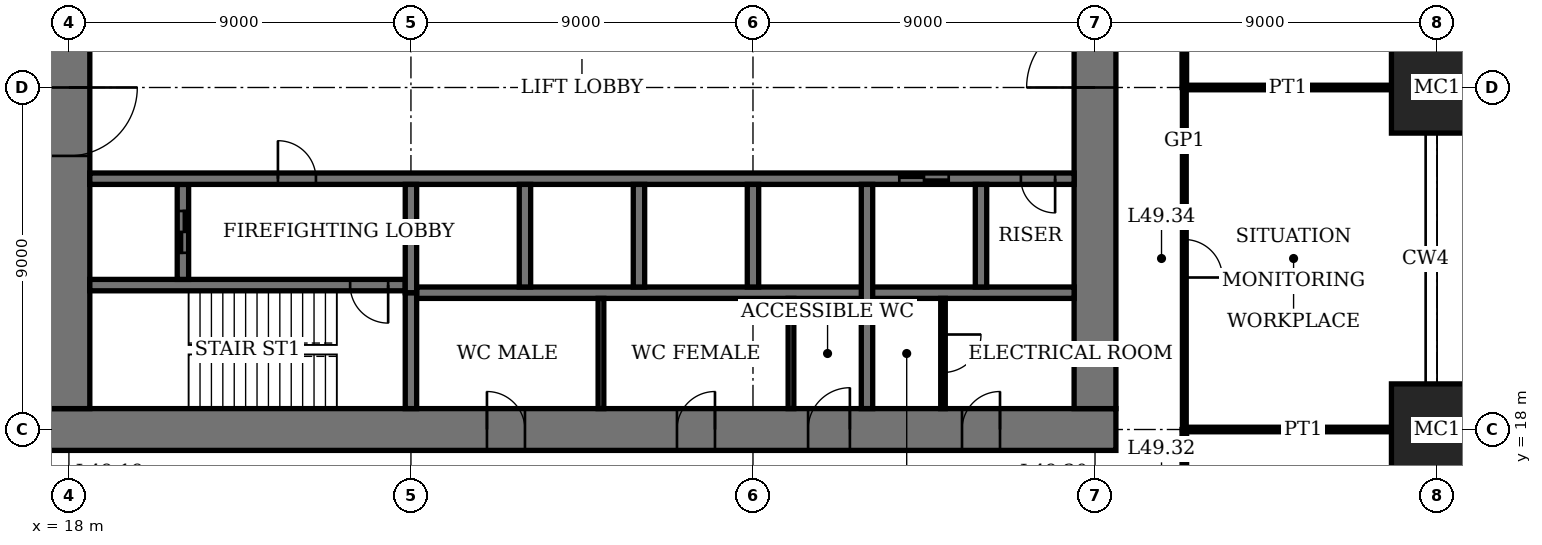
"""IFC4 building model, lengths in metres.
Left out: names, types, materials, properties, quantities, classifications, styles, units other than length and angle.
Written with IfcOpenShell. Run it as: python <this file> out.ifc"""

import sys

from ifc_helpers import new_model, si_unit, direction, frame, frame_2d, origin, origin_2d, place, context, subcontext, project, spatial, rectangle, extrude, element, fill, save


model = new_model("IFC4")
c1 = context("Model", 3, precision=1e-05, world=origin(), true_north=direction((0.0, 1.0)))
c2 = subcontext(c1, "Body", "Model", "MODEL_VIEW")
j1 = project(units=[si_unit("LENGTHUNIT", "METRE"), si_unit("PLANEANGLEUNIT", "RADIAN")], contexts=[c1])
p1 = place(None, origin())
s1 = spatial("IfcSite", under=j1, at=p1, CompositionType="ELEMENT")
p2 = place(p1, origin())
s2 = spatial("IfcBuilding", under=s1, at=p2, CompositionType="ELEMENT")
p3 = place(p2, frame((0.0, 0.0, 202.2)))
s3 = spatial("IfcBuildingStorey", under=s2, at=p3, CompositionType="ELEMENT", Elevation=202.2)
for number, where, z_axis, x_axis in (
    (1, (54.0, 18.0, 0.0), (0.0, 0.0, 1.0), (1.0, 0.0, 0.0)),
    (2, (54.0, 27.0, 0.0), (0.0, 0.0, 1.0), (1.0, 0.0, 0.0)),
):
    element("IfcColumn", number, at=place(p3, frame(where, z_axis=z_axis, x_axis=x_axis)), inside=s3, PredefinedType="COLUMN", context=c2, shape_type="SweptSolid", body=[
        extrude(rectangle(XDim=2.4, YDim=2.4, at=origin_2d()), origin(), (0.0, 0.0, 1.0), 4.0),
    ])
p4 = place(p3, frame((17.45, 18.0, 0.0), z_axis=(0.0, 0.0, 1.0), x_axis=(1.0, 0.0, 0.0)))
e3 = element("IfcWall", 3, at=p4, inside=s3, PredefinedType="SHEAR", context=c2, shape_type="SweptSolid", body=[
    extrude(rectangle(XDim=28.1, YDim=1.1, at=frame_2d((14.05, 0.0))), origin(), (0.0, 0.0, 1.0), 4.0),
])
p5 = place(p4, frame((11.55, 0.0, 0.0)))
e4 = element("IfcOpeningElement", 4, at=p5, cuts=e3, PredefinedType="OPENING", context=c2, shape_type="SweptSolid", body=[
    extrude(rectangle(XDim=1.0, YDim=2.4, at=frame_2d((0.5, 1.2))), frame((0.0, 0.56, 0.0), z_axis=(0.0, -1.0, 0.0), x_axis=(1.0, 0.0, 0.0)), (0.0, 0.0, 1.0), 1.12),
])
p6 = place(p4, frame((16.55, 0.0, 0.0)))
e5 = element("IfcOpeningElement", 5, at=p6, cuts=e3, PredefinedType="OPENING", context=c2, shape_type="SweptSolid", body=[
    extrude(rectangle(XDim=1.0, YDim=2.4, at=frame_2d((0.5, 1.2))), frame((0.0, 0.56, 0.0), z_axis=(0.0, -1.0, 0.0), x_axis=(1.0, 0.0, 0.0)), (0.0, 0.0, 1.0), 1.12),
])
p7 = place(p4, frame((20.0, 0.0, 0.0)))
e6 = element("IfcOpeningElement", 6, at=p7, cuts=e3, PredefinedType="OPENING", context=c2, shape_type="SweptSolid", body=[
    extrude(rectangle(XDim=1.1, YDim=2.4, at=frame_2d((0.55, 1.2))), frame((0.0, 0.56, 0.0), z_axis=(0.0, -1.0, 0.0), x_axis=(1.0, 0.0, 0.0)), (0.0, 0.0, 1.0), 1.12),
])
p8 = place(p4, frame((24.05, 0.0, 0.0)))
e7 = element("IfcOpeningElement", 7, at=p8, cuts=e3, PredefinedType="OPENING", context=c2, shape_type="SweptSolid", body=[
    extrude(rectangle(XDim=1.0, YDim=2.4, at=frame_2d((0.5, 1.2))), frame((0.0, 0.56, 0.0), z_axis=(0.0, -1.0, 0.0), x_axis=(1.0, 0.0, 0.0)), (0.0, 0.0, 1.0), 1.12),
])
p9 = place(p3, frame((18.0, 35.45, 0.0), z_axis=(0.0, 0.0, 1.0), x_axis=(0.0, -1.0, 0.0)))
e8 = element("IfcWall", 8, at=p9, inside=s3, PredefinedType="SHEAR", context=c2, shape_type="SweptSolid", body=[
    extrude(rectangle(XDim=16.9, YDim=1.1, at=frame_2d((8.45, 0.0))), origin(), (0.0, 0.0, 1.0), 4.0),
])
p10 = place(p9, frame((8.45, 0.0, 0.0)))
e9 = element("IfcOpeningElement", 9, at=p10, cuts=e8, PredefinedType="OPENING", context=c2, shape_type="SweptSolid", body=[
    extrude(rectangle(XDim=1.8, YDim=2.4, at=frame_2d((0.9, 1.2))), frame((0.0, 0.56, 0.0), z_axis=(0.0, -1.0, 0.0), x_axis=(1.0, 0.0, 0.0)), (0.0, 0.0, 1.0), 1.12),
])
p11 = place(p3, frame((45.0, 18.55, 0.0), z_axis=(0.0, 0.0, 1.0), x_axis=(0.0, 1.0, 0.0)))
e10 = element("IfcWall", 10, at=p11, inside=s3, PredefinedType="SHEAR", context=c2, shape_type="SweptSolid", body=[
    extrude(rectangle(XDim=16.9, YDim=1.1, at=frame_2d((8.45, 0.0))), origin(), (0.0, 0.0, 1.0), 4.0),
])
p12 = place(p11, frame((8.45, 0.0, 0.0)))
e11 = element("IfcOpeningElement", 11, at=p12, cuts=e10, PredefinedType="OPENING", context=c2, shape_type="SweptSolid", body=[
    extrude(rectangle(XDim=1.8, YDim=2.4, at=frame_2d((0.9, 1.2))), frame((0.0, 0.56, 0.0), z_axis=(0.0, -1.0, 0.0), x_axis=(1.0, 0.0, 0.0)), (0.0, 0.0, 1.0), 1.12),
])
p13 = place(p3, frame((18.55, 21.8, 0.0), z_axis=(0.0, 0.0, 1.0), x_axis=(1.0, 0.0, 0.0)))
e12 = element("IfcWall", 12, at=p13, inside=s3, PredefinedType="SHEAR", context=c2, shape_type="SweptSolid", body=[
    extrude(rectangle(XDim=8.3, YDim=0.3, at=frame_2d((4.15, 0.0))), origin(), (0.0, 0.0, 1.0), 4.0),
])
p14 = place(p13, frame((6.85, 0.0, 0.0)))
e13 = element("IfcOpeningElement", 13, at=p14, cuts=e12, PredefinedType="OPENING", context=c2, shape_type="SweptSolid", body=[
    extrude(rectangle(XDim=1.0, YDim=2.4, at=frame_2d((0.5, 1.2))), frame((0.0, 0.16, 0.0), z_axis=(0.0, -1.0, 0.0), x_axis=(1.0, 0.0, 0.0)), (0.0, 0.0, 1.0), 0.32),
])
p15 = place(p3, frame((27.0, 18.55, 0.0), z_axis=(0.0, 0.0, 1.0), x_axis=(0.0, 1.0, 0.0)))
e14 = element("IfcWall", 14, at=p15, inside=s3, PredefinedType="SHEAR", context=c2, shape_type="SweptSolid", body=[
    extrude(rectangle(XDim=3.05, YDim=0.3, at=frame_2d((1.525, 0.0))), origin(), (0.0, 0.0, 1.0), 4.0),
])
p16 = place(p3, frame((21.0, 21.95, 0.0), z_axis=(0.0, 0.0, 1.0), x_axis=(0.0, 1.0, 0.0)))
e15 = element("IfcWall", 15, at=p16, inside=s3, PredefinedType="SHEAR", context=c2, shape_type="SweptSolid", body=[
    extrude(rectangle(XDim=2.5, YDim=0.3, at=frame_2d((1.25, 0.0))), origin(), (0.0, 0.0, 1.0), 4.0),
])
p17 = place(p16, frame((0.7, 0.0, 0.0)))
e16 = element("IfcOpeningElement", 16, at=p17, cuts=e15, PredefinedType="OPENING", context=c2, shape_type="SweptSolid", body=[
    extrude(rectangle(XDim=1.1, YDim=2.4, at=frame_2d((0.55, 1.2))), frame((0.0, 0.16, 0.0), z_axis=(0.0, -1.0, 0.0), x_axis=(1.0, 0.0, 0.0)), (0.0, 0.0, 1.0), 0.32),
])
p18 = place(p3, frame((18.55, 24.6, 0.0), z_axis=(0.0, 0.0, 1.0), x_axis=(1.0, 0.0, 0.0)))
e17 = element("IfcWall", 17, at=p18, inside=s3, PredefinedType="SHEAR", context=c2, shape_type="SweptSolid", body=[
    extrude(rectangle(XDim=25.9, YDim=0.3, at=frame_2d((12.95, 0.0))), origin(), (0.0, 0.0, 1.0), 4.0),
])
p19 = place(p18, frame((4.95, 0.0, 0.0)))
e18 = element("IfcOpeningElement", 18, at=p19, cuts=e17, PredefinedType="OPENING", context=c2, shape_type="SweptSolid", body=[
    extrude(rectangle(XDim=1.0, YDim=2.4, at=frame_2d((0.5, 1.2))), frame((0.0, 0.16, 0.0), z_axis=(0.0, -1.0, 0.0), x_axis=(1.0, 0.0, 0.0)), (0.0, 0.0, 1.0), 0.32),
])
p20 = place(p18, frame((24.5, 0.0, 0.0)))
e19 = element("IfcOpeningElement", 19, at=p20, cuts=e17, PredefinedType="OPENING", context=c2, shape_type="SweptSolid", body=[
    extrude(rectangle(XDim=0.9, YDim=2.1, at=frame_2d((0.45, 1.05))), frame((0.0, 0.16, 0.0), z_axis=(0.0, -1.0, 0.0), x_axis=(1.0, 0.0, 0.0)), (0.0, 0.0, 1.0), 0.32),
])
p21 = place(p18, frame((21.3, 0.0, 0.0)))
e20 = element("IfcOpeningElement", 20, at=p21, cuts=e17, PredefinedType="OPENING", context=c2, shape_type="SweptSolid", body=[
    extrude(rectangle(XDim=1.3, YDim=2.4, at=frame_2d((0.65, 1.2))), frame((0.0, 0.16, 0.0), z_axis=(0.0, -1.0, 0.0), x_axis=(1.0, 0.0, 0.0)), (0.0, 0.0, 1.0), 0.32),
])
p22 = place(p3, frame((27.15, 21.6, 0.0), z_axis=(0.0, 0.0, 1.0), x_axis=(1.0, 0.0, 0.0)))
e21 = element("IfcWall", 21, at=p22, inside=s3, PredefinedType="SHEAR", context=c2, shape_type="SweptSolid", body=[
    extrude(rectangle(XDim=17.3, YDim=0.3, at=frame_2d((8.65, 0.0))), origin(), (0.0, 0.0, 1.0), 4.0),
])
for number, where, z_axis, x_axis in (
    (22, (30.0, 21.75, 0.0), (0.0, 0.0, 1.0), (0.0, 1.0, 0.0)),
    (23, (33.0, 21.75, 0.0), (0.0, 0.0, 1.0), (0.0, 1.0, 0.0)),
    (24, (36.0, 21.75, 0.0), (0.0, 0.0, 1.0), (0.0, 1.0, 0.0)),
):
    element("IfcWall", number, at=place(p3, frame(where, z_axis=z_axis, x_axis=x_axis)), inside=s3, PredefinedType="SHEAR", context=c2, shape_type="SweptSolid", body=[
        extrude(rectangle(XDim=2.7, YDim=0.3, at=frame_2d((1.35, 0.0))), origin(), (0.0, 0.0, 1.0), 4.0),
    ])
p23 = place(p3, frame((39.0, 18.55, 0.0), z_axis=(0.0, 0.0, 1.0), x_axis=(0.0, 1.0, 0.0)))
e25 = element("IfcWall", 25, at=p23, inside=s3, PredefinedType="SHEAR", context=c2, shape_type="SweptSolid", body=[
    extrude(rectangle(XDim=5.9, YDim=0.3, at=frame_2d((2.95, 0.0))), origin(), (0.0, 0.0, 1.0), 4.0),
])
p24 = place(p3, frame((42.0, 21.75, 0.0), z_axis=(0.0, 0.0, 1.0), x_axis=(0.0, 1.0, 0.0)))
e26 = element("IfcWall", 26, at=p24, inside=s3, PredefinedType="SHEAR", context=c2, shape_type="SweptSolid", body=[
    extrude(rectangle(XDim=2.7, YDim=0.3, at=frame_2d((1.35, 0.0))), origin(), (0.0, 0.0, 1.0), 4.0),
])
p25 = place(p3, frame((27.0, 21.6, 0.0), z_axis=(0.0, 0.0, 1.0), x_axis=(0.0, 1.0, 0.0)))
e27 = element("IfcWall", 27, at=p25, inside=s3, PredefinedType="SHEAR", context=c2, shape_type="SweptSolid", body=[
    extrude(rectangle(XDim=2.85, YDim=0.3, at=frame_2d((1.425, 0.0))), origin(), (0.0, 0.0, 1.0), 4.0),
])
for number, where, z_axis, x_axis in (
    (28, (47.35, 18.0, 0.0), (0.0, 0.0, 1.0), (1.0, 0.0, 0.0)),
    (29, (47.35, 27.0, 0.0), (0.0, 0.0, 1.0), (1.0, 0.0, 0.0)),
):
    element("IfcWall", number, at=place(p3, frame(where, z_axis=z_axis, x_axis=x_axis)), inside=s3, PredefinedType="PARTITIONING", context=c2, shape_type="SweptSolid", body=[
        extrude(rectangle(XDim=5.45, YDim=0.12, at=frame_2d((2.725, 0.0))), origin(), (0.0, 0.0, 1.0), 3.05),
    ])
p26 = place(p3, frame((47.35, 13.25, 0.0), z_axis=(0.0, 0.0, 1.0), x_axis=(0.0, 1.0, 0.0)))
e30 = element("IfcWall", 30, at=p26, inside=s3, PredefinedType="PARTITIONING", context=c2, shape_type="SweptSolid", body=[
    extrude(rectangle(XDim=4.75, YDim=0.12, at=frame_2d((2.375, 0.0))), origin(), (0.0, 0.0, 1.0), 3.75),
])
p27 = place(p26, frame((2.625, 0.0, 0.0)))
e31 = element("IfcOpeningElement", 31, at=p27, cuts=e30, PredefinedType="OPENING", context=c2, shape_type="SweptSolid", body=[
    extrude(rectangle(XDim=1.0, YDim=2.4, at=frame_2d((0.5, 1.2))), frame((0.0, 0.07, 0.0), z_axis=(0.0, -1.0, 0.0), x_axis=(1.0, 0.0, 0.0)), (0.0, 0.0, 1.0), 0.14),
])
p28 = place(p3, frame((47.35, 27.0, 0.0), z_axis=(0.0, 0.0, 1.0), x_axis=(0.0, 1.0, 0.0)))
e32 = element("IfcWall", 32, at=p28, inside=s3, PredefinedType="PARTITIONING", context=c2, shape_type="SweptSolid", body=[
    extrude(rectangle(XDim=9.0, YDim=0.12, at=frame_2d((4.5, 0.0))), origin(), (0.0, 0.0, 1.0), 3.75),
])
p29 = place(p28, frame((4.0, 0.0, 0.0)))
e33 = element("IfcOpeningElement", 33, at=p29, cuts=e32, PredefinedType="OPENING", context=c2, shape_type="SweptSolid", body=[
    extrude(rectangle(XDim=1.0, YDim=2.4, at=frame_2d((0.5, 1.2))), frame((0.0, 0.07, 0.0), z_axis=(0.0, -1.0, 0.0), x_axis=(1.0, 0.0, 0.0)), (0.0, 0.0, 1.0), 0.14),
])
p30 = place(p3, frame((47.35, 18.0, 0.0), z_axis=(0.0, 0.0, 1.0), x_axis=(0.0, 1.0, 0.0)))
e34 = element("IfcWall", 34, at=p30, inside=s3, PredefinedType="PARTITIONING", context=c2, shape_type="SweptSolid", body=[
    extrude(rectangle(XDim=9.0, YDim=0.1, at=frame_2d((4.5, 0.0))), origin(), (0.0, 0.0, 1.0), 3.75),
])
p31 = place(p30, frame((4.0, 0.0, 0.0)))
e35 = element("IfcOpeningElement", 35, at=p31, cuts=e34, PredefinedType="OPENING", context=c2, shape_type="SweptSolid", body=[
    extrude(rectangle(XDim=1.0, YDim=2.4, at=frame_2d((0.5, 1.2))), frame((0.0, 0.06, 0.0), z_axis=(0.0, -1.0, 0.0), x_axis=(1.0, 0.0, 0.0)), (0.0, 0.0, 1.0), 0.12),
])
for number, where, z_axis, x_axis in (
    (36, (32.0, 18.55, 0.0), (0.0, 0.0, 1.0), (0.0, 1.0, 0.0)),
    (37, (37.0, 18.55, 0.0), (0.0, 0.0, 1.0), (0.0, 1.0, 0.0)),
):
    element("IfcWall", number, at=place(p3, frame(where, z_axis=z_axis, x_axis=x_axis)), inside=s3, PredefinedType="PARTITIONING", context=c2, shape_type="SweptSolid", body=[
        extrude(rectangle(XDim=2.9, YDim=0.15, at=frame_2d((1.45, 0.0))), origin(), (0.0, 0.0, 1.0), 3.75),
    ])
p32 = place(p3, frame((41.0, 18.55, 0.0), z_axis=(0.0, 0.0, 1.0), x_axis=(0.0, 1.0, 0.0)))
e38 = element("IfcWall", 38, at=p32, inside=s3, PredefinedType="PARTITIONING", context=c2, shape_type="SweptSolid", body=[
    extrude(rectangle(XDim=2.9, YDim=0.12, at=frame_2d((1.45, 0.0))), origin(), (0.0, 0.0, 1.0), 3.75),
])
p33 = place(p32, frame((0.95, 0.0, 0.0)))
e39 = element("IfcOpeningElement", 39, at=p33, cuts=e38, PredefinedType="OPENING", context=c2, shape_type="SweptSolid", body=[
    extrude(rectangle(XDim=1.0, YDim=2.4, at=frame_2d((0.5, 1.2))), frame((0.0, 0.07, 0.0), z_axis=(0.0, -1.0, 0.0), x_axis=(1.0, 0.0, 0.0)), (0.0, 0.0, 1.0), 0.14),
])
p34 = place(p10, origin())
e40 = element("IfcDoor", 40, at=p34, inside=s3, OperationType="DOUBLE_DOOR_DOUBLE_SWING", PredefinedType="DOOR", context=c2, shape_type="SweptSolid", body=[
    extrude(rectangle(XDim=1.8, YDim=2.4, at=frame_2d((0.9, 1.2))), frame((0.0, 0.03, 0.0), z_axis=(0.0, -1.0, 0.0), x_axis=(1.0, 0.0, 0.0)), (0.0, 0.0, 1.0), 0.06),
    extrude(rectangle(XDim=0.04, YDim=2.4, at=frame_2d((0.02, 1.2))), frame((0.0, 0.55, 0.0), z_axis=(0.0, -1.0, 0.0), x_axis=(1.0, 0.0, 0.0)), (0.0, 0.0, 1.0), 1.1),
    extrude(rectangle(XDim=0.04, YDim=2.4, at=frame_2d((1.78, 1.2))), frame((0.0, 0.55, 0.0), z_axis=(0.0, -1.0, 0.0), x_axis=(1.0, 0.0, 0.0)), (0.0, 0.0, 1.0), 1.1),
    extrude(rectangle(XDim=1.8, YDim=0.04, at=frame_2d((0.9, 2.38))), frame((0.0, 0.55, 0.0), z_axis=(0.0, -1.0, 0.0), x_axis=(1.0, 0.0, 0.0)), (0.0, 0.0, 1.0), 1.1),
])
fill(e9, e40)
p35 = place(p12, origin())
e41 = element("IfcDoor", 41, at=p35, inside=s3, OperationType="DOUBLE_DOOR_DOUBLE_SWING", PredefinedType="DOOR", context=c2, shape_type="SweptSolid", body=[
    extrude(rectangle(XDim=1.8, YDim=2.4, at=frame_2d((0.9, 1.2))), frame((0.0, 0.03, 0.0), z_axis=(0.0, -1.0, 0.0), x_axis=(1.0, 0.0, 0.0)), (0.0, 0.0, 1.0), 0.06),
    extrude(rectangle(XDim=0.04, YDim=2.4, at=frame_2d((0.02, 1.2))), frame((0.0, 0.55, 0.0), z_axis=(0.0, -1.0, 0.0), x_axis=(1.0, 0.0, 0.0)), (0.0, 0.0, 1.0), 1.1),
    extrude(rectangle(XDim=0.04, YDim=2.4, at=frame_2d((1.78, 1.2))), frame((0.0, 0.55, 0.0), z_axis=(0.0, -1.0, 0.0), x_axis=(1.0, 0.0, 0.0)), (0.0, 0.0, 1.0), 1.1),
    extrude(rectangle(XDim=1.8, YDim=0.04, at=frame_2d((0.9, 2.38))), frame((0.0, 0.55, 0.0), z_axis=(0.0, -1.0, 0.0), x_axis=(1.0, 0.0, 0.0)), (0.0, 0.0, 1.0), 1.1),
])
fill(e11, e41)
p36 = place(p5, origin())
e42 = element("IfcDoor", 42, at=p36, inside=s3, OperationType="SINGLE_SWING_RIGHT", PredefinedType="DOOR", context=c2, shape_type="SweptSolid", body=[
    extrude(rectangle(XDim=1.0, YDim=2.4, at=frame_2d((0.5, 1.2))), frame((0.0, 0.025, 0.0), z_axis=(0.0, -1.0, 0.0), x_axis=(1.0, 0.0, 0.0)), (0.0, 0.0, 1.0), 0.05),
    extrude(rectangle(XDim=0.04, YDim=2.4, at=frame_2d((0.02, 1.2))), frame((0.0, 0.4, 0.0), z_axis=(0.0, -1.0, 0.0), x_axis=(1.0, 0.0, 0.0)), (0.0, 0.0, 1.0), 0.8),
    extrude(rectangle(XDim=0.04, YDim=2.4, at=frame_2d((0.98, 1.2))), frame((0.0, 0.4, 0.0), z_axis=(0.0, -1.0, 0.0), x_axis=(1.0, 0.0, 0.0)), (0.0, 0.0, 1.0), 0.8),
    extrude(rectangle(XDim=1.0, YDim=0.04, at=frame_2d((0.5, 2.38))), frame((0.0, 0.4, 0.0), z_axis=(0.0, -1.0, 0.0), x_axis=(1.0, 0.0, 0.0)), (0.0, 0.0, 1.0), 0.8),
])
fill(e4, e42)
p37 = place(p6, origin())
e43 = element("IfcDoor", 43, at=p37, inside=s3, OperationType="SINGLE_SWING_LEFT", PredefinedType="DOOR", context=c2, shape_type="SweptSolid", body=[
    extrude(rectangle(XDim=1.0, YDim=2.4, at=frame_2d((0.5, 1.2))), frame((0.0, 0.025, 0.0), z_axis=(0.0, -1.0, 0.0), x_axis=(1.0, 0.0, 0.0)), (0.0, 0.0, 1.0), 0.05),
    extrude(rectangle(XDim=0.04, YDim=2.4, at=frame_2d((0.02, 1.2))), frame((0.0, 0.4, 0.0), z_axis=(0.0, -1.0, 0.0), x_axis=(1.0, 0.0, 0.0)), (0.0, 0.0, 1.0), 0.8),
    extrude(rectangle(XDim=0.04, YDim=2.4, at=frame_2d((0.98, 1.2))), frame((0.0, 0.4, 0.0), z_axis=(0.0, -1.0, 0.0), x_axis=(1.0, 0.0, 0.0)), (0.0, 0.0, 1.0), 0.8),
    extrude(rectangle(XDim=1.0, YDim=0.04, at=frame_2d((0.5, 2.38))), frame((0.0, 0.4, 0.0), z_axis=(0.0, -1.0, 0.0), x_axis=(1.0, 0.0, 0.0)), (0.0, 0.0, 1.0), 0.8),
])
fill(e5, e43)
p38 = place(p7, origin())
e44 = element("IfcDoor", 44, at=p38, inside=s3, OperationType="SINGLE_SWING_LEFT", PredefinedType="DOOR", context=c2, shape_type="SweptSolid", body=[
    extrude(rectangle(XDim=1.1, YDim=2.4, at=frame_2d((0.55, 1.2))), frame((0.0, 0.025, 0.0), z_axis=(0.0, -1.0, 0.0), x_axis=(1.0, 0.0, 0.0)), (0.0, 0.0, 1.0), 0.05),
    extrude(rectangle(XDim=0.04, YDim=2.4, at=frame_2d((0.02, 1.2))), frame((0.0, 0.44, 0.0), z_axis=(0.0, -1.0, 0.0), x_axis=(1.0, 0.0, 0.0)), (0.0, 0.0, 1.0), 0.88),
    extrude(rectangle(XDim=0.04, YDim=2.4, at=frame_2d((1.08, 1.2))), frame((0.0, 0.44, 0.0), z_axis=(0.0, -1.0, 0.0), x_axis=(1.0, 0.0, 0.0)), (0.0, 0.0, 1.0), 0.88),
    extrude(rectangle(XDim=1.1, YDim=0.04, at=frame_2d((0.55, 2.38))), frame((0.0, 0.44, 0.0), z_axis=(0.0, -1.0, 0.0), x_axis=(1.0, 0.0, 0.0)), (0.0, 0.0, 1.0), 0.88),
])
fill(e6, e44)
p39 = place(p8, origin())
e45 = element("IfcDoor", 45, at=p39, inside=s3, OperationType="SINGLE_SWING_LEFT", PredefinedType="DOOR", context=c2, shape_type="SweptSolid", body=[
    extrude(rectangle(XDim=1.0, YDim=2.4, at=frame_2d((0.5, 1.2))), frame((0.0, 0.025, 0.0), z_axis=(0.0, -1.0, 0.0), x_axis=(1.0, 0.0, 0.0)), (0.0, 0.0, 1.0), 0.05),
    extrude(rectangle(XDim=0.04, YDim=2.4, at=frame_2d((0.02, 1.2))), frame((0.0, 0.4, 0.0), z_axis=(0.0, -1.0, 0.0), x_axis=(1.0, 0.0, 0.0)), (0.0, 0.0, 1.0), 0.8),
    extrude(rectangle(XDim=0.04, YDim=2.4, at=frame_2d((0.98, 1.2))), frame((0.0, 0.4, 0.0), z_axis=(0.0, -1.0, 0.0), x_axis=(1.0, 0.0, 0.0)), (0.0, 0.0, 1.0), 0.8),
    extrude(rectangle(XDim=1.0, YDim=0.04, at=frame_2d((0.5, 2.38))), frame((0.0, 0.4, 0.0), z_axis=(0.0, -1.0, 0.0), x_axis=(1.0, 0.0, 0.0)), (0.0, 0.0, 1.0), 0.8),
])
fill(e7, e45)
p40 = place(p14, origin())
e46 = element("IfcDoor", 46, at=p40, inside=s3, OperationType="SINGLE_SWING_RIGHT", PredefinedType="DOOR", context=c2, shape_type="SweptSolid", body=[
    extrude(rectangle(XDim=1.0, YDim=2.4, at=frame_2d((0.5, 1.2))), frame((0.0, 0.03, 0.0), z_axis=(0.0, -1.0, 0.0), x_axis=(1.0, 0.0, 0.0)), (0.0, 0.0, 1.0), 0.06),
])
fill(e13, e46)
p41 = place(p19, origin())
e47 = element("IfcDoor", 47, at=p41, inside=s3, OperationType="SINGLE_SWING_RIGHT", PredefinedType="DOOR", context=c2, shape_type="SweptSolid", body=[
    extrude(rectangle(XDim=1.0, YDim=2.4, at=frame_2d((0.5, 1.2))), frame((0.0, 0.03, 0.0), z_axis=(0.0, -1.0, 0.0), x_axis=(1.0, 0.0, 0.0)), (0.0, 0.0, 1.0), 0.06),
])
fill(e18, e47)
p42 = place(p20, origin())
e48 = element("IfcDoor", 48, at=p42, inside=s3, OperationType="SINGLE_SWING_RIGHT", PredefinedType="DOOR", context=c2, shape_type="SweptSolid", body=[
    extrude(rectangle(XDim=0.9, YDim=2.1, at=frame_2d((0.45, 1.05))), frame((0.0, 0.03, 0.0), z_axis=(0.0, -1.0, 0.0), x_axis=(1.0, 0.0, 0.0)), (0.0, 0.0, 1.0), 0.06),
])
fill(e19, e48)
p43 = place(p31, origin())
e49 = element("IfcDoor", 49, at=p43, inside=s3, OperationType="SINGLE_SWING_LEFT", PredefinedType="DOOR", context=c2, shape_type="SweptSolid", body=[
    extrude(rectangle(XDim=1.0, YDim=2.4, at=frame_2d((0.5, 1.2))), frame((0.0, 0.02, 0.0), z_axis=(0.0, -1.0, 0.0), x_axis=(1.0, 0.0, 0.0)), (0.0, 0.0, 1.0), 0.04),
])
fill(e35, e49)
p44 = place(p33, origin())
e50 = element("IfcDoor", 50, at=p44, inside=s3, OperationType="SINGLE_SWING_RIGHT", PredefinedType="DOOR", context=c2, shape_type="SweptSolid", body=[
    extrude(rectangle(XDim=1.0, YDim=2.4, at=frame_2d((0.5, 1.2))), frame((0.0, 0.03, 0.0), z_axis=(0.0, -1.0, 0.0), x_axis=(1.0, 0.0, 0.0)), (0.0, 0.0, 1.0), 0.06),
])
fill(e39, e50)
p45 = place(p21, origin())
e51 = element("IfcDoor", 51, at=p45, inside=s3, OperationType="DOUBLE_DOOR_SLIDING", PredefinedType="DOOR", context=c2, shape_type="SweptSolid", body=[
    extrude(rectangle(XDim=1.3, YDim=2.4, at=frame_2d((0.65, 1.2))), frame((0.0, 0.02, 0.0), z_axis=(0.0, -1.0, 0.0), x_axis=(1.0, 0.0, 0.0)), (0.0, 0.0, 1.0), 0.04),
])
fill(e20, e51)
p46 = place(p17, origin())
e52 = element("IfcDoor", 52, at=p46, inside=s3, OperationType="DOUBLE_DOOR_SLIDING", PredefinedType="DOOR", context=c2, shape_type="SweptSolid", body=[
    extrude(rectangle(XDim=1.1, YDim=2.4, at=frame_2d((0.55, 1.2))), frame((0.0, 0.03, 0.0), z_axis=(0.0, -1.0, 0.0), x_axis=(1.0, 0.0, 0.0)), (0.0, 0.0, 1.0), 0.06),
])
fill(e16, e52)
save(model, sys.argv[1])
